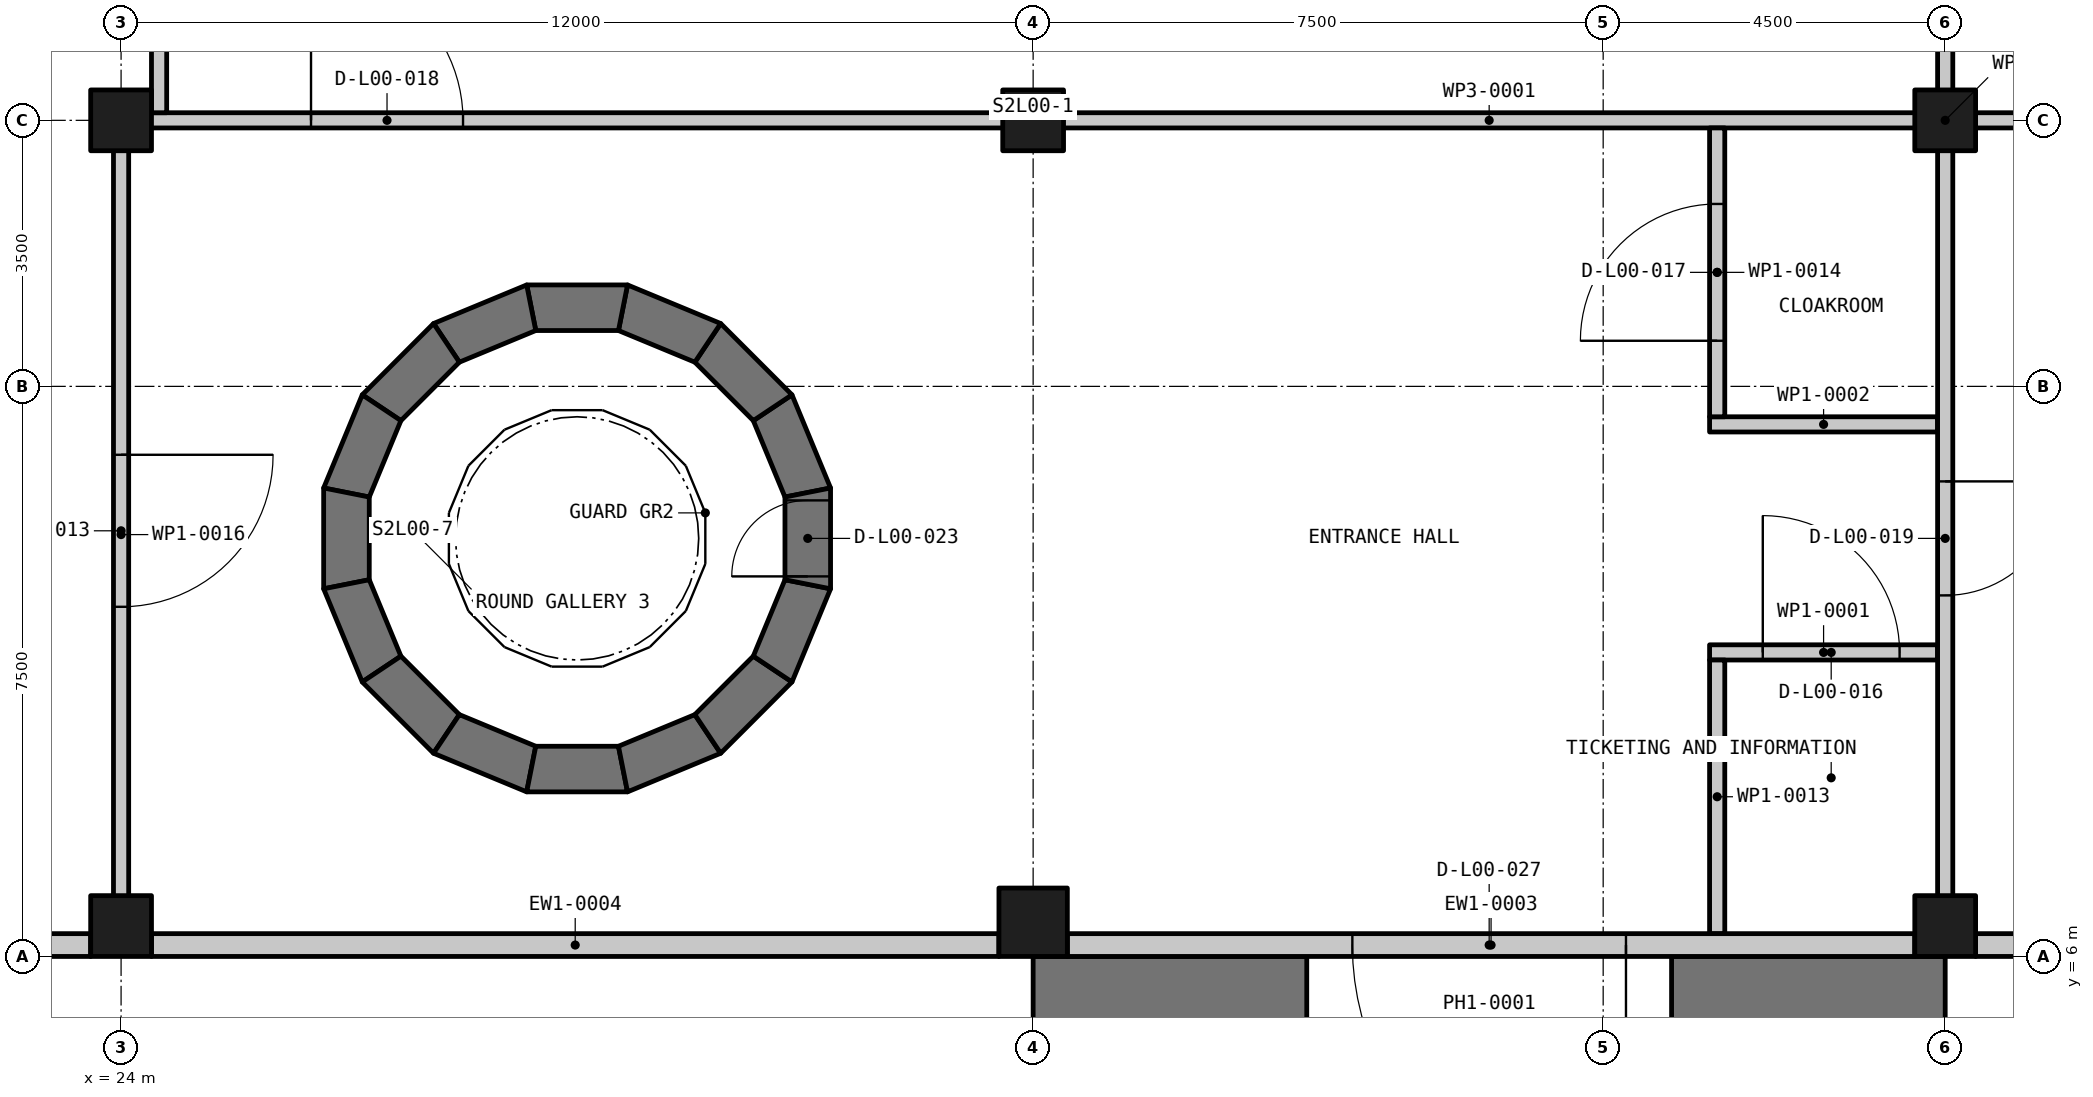
"""IFC4 building model, lengths in metres.
Left out: names, types, materials, properties, quantities, classifications, styles, units other than length and angle.
Written with IfcOpenShell. Run it as: python <this file> out.ifc"""

import sys

from ifc_helpers import new_model, si_unit, direction, frame, frame_2d, origin, origin_2d, place, context, subcontext, project, spatial, polyline, rectangle, outline, extrude, element, fill, save


model = new_model("IFC4")
c1 = context("Model", 3, precision=1e-05, world=origin(), true_north=direction((0.0, 1.0)))
c2 = subcontext(c1, "Body", "Model", "MODEL_VIEW")
j1 = project(units=[si_unit("LENGTHUNIT", "METRE"), si_unit("PLANEANGLEUNIT", "RADIAN")], contexts=[c1])
p1 = place(None, origin())
s1 = spatial("IfcSite", under=j1, at=p1, CompositionType="ELEMENT")
p2 = place(p1, origin())
s2 = spatial("IfcBuilding", under=s1, at=p2, CompositionType="ELEMENT")
p3 = place(p2, origin())
s3 = spatial("IfcBuildingStorey", under=s2, at=p3, CompositionType="ELEMENT", Elevation=0.0)
for number, where, z_axis, x_axis in (
    (1, (24.0, 6.4, -0.2), (0.0, 0.0, 1.0), (1.0, 0.0, 0.0)),
    (2, (24.0, 17.0, -0.2), (0.0, 0.0, 1.0), (1.0, 0.0, 0.0)),
):
    element("IfcColumn", number, at=place(p3, frame(where, z_axis=z_axis, x_axis=x_axis)), inside=s3, PredefinedType="COLUMN", context=c2, shape_type="SweptSolid", body=[
        extrude(rectangle(XDim=0.8, YDim=0.8, at=origin_2d()), origin(), (0.0, 0.0, 1.0), 5.9),
    ])
p4 = place(p3, frame((36.0, 6.45, -0.2), z_axis=(0.0, 0.0, 1.0), x_axis=(1.0, 0.0, 0.0)))
e3 = element("IfcColumn", 3, at=p4, inside=s3, PredefinedType="COLUMN", context=c2, shape_type="SweptSolid", body=[
    extrude(rectangle(XDim=0.9, YDim=0.9, at=origin_2d()), origin(), (0.0, 0.0, 1.0), 5.9),
])
for number, where, z_axis, x_axis in (
    (4, (36.0, 17.0, -0.2), (0.0, 0.0, 1.0), (1.0, 0.0, 0.0)),
    (5, (48.0, 6.4, -0.2), (0.0, 0.0, 1.0), (1.0, 0.0, 0.0)),
    (6, (48.0, 17.0, -0.2), (0.0, 0.0, 1.0), (1.0, 0.0, 0.0)),
):
    element("IfcColumn", number, at=place(p3, frame(where, z_axis=z_axis, x_axis=x_axis)), inside=s3, PredefinedType="COLUMN", context=c2, shape_type="SweptSolid", body=[
        extrude(rectangle(XDim=0.8, YDim=0.8, at=origin_2d()), origin(), (0.0, 0.0, 1.0), 5.9),
    ])
p5 = place(p3, frame((33.058, 12.049, -0.2), z_axis=(0.0, 0.0, 1.0), x_axis=(-0.382785205205, 0.923837370253, 0.0)))
e7 = element("IfcWall", 7, at=p5, inside=s3, PredefinedType="SHEAR", context=c2, shape_type="SweptSolid", body=[
    extrude(outline(polyline([(0.0, -0.3), (1.327, -0.3), (1.207, 0.3), (0.119, 0.3), (0.0, -0.3)])), origin(), (0.0, 0.0, 1.0), 5.9),
])
p6 = place(p3, frame((32.615, 13.177, -0.2), z_axis=(0.0, 0.0, 1.0), x_axis=(-0.707106781187, 0.707106781187, 0.0)))
e8 = element("IfcWall", 8, at=p6, inside=s3, PredefinedType="SHEAR", context=c2, shape_type="SweptSolid", body=[
    extrude(outline(polyline([(0.0, -0.3), (1.326, -0.3), (1.207, 0.3), (0.119, 0.3), (0.0, -0.3)])), origin(), (0.0, 0.0, 1.0), 5.9),
])
p7 = place(p3, frame((31.774, 14.05, -0.2), z_axis=(0.0, 0.0, 1.0), x_axis=(-0.923837370253, 0.382785205205, 0.0)))
e9 = element("IfcWall", 9, at=p7, inside=s3, PredefinedType="SHEAR", context=c2, shape_type="SweptSolid", body=[
    extrude(outline(polyline([(0.0, -0.3), (1.327, -0.3), (1.207, 0.3), (0.119, 0.3), (0.0, -0.3)])), origin(), (0.0, 0.0, 1.0), 5.9),
])
p8 = place(p3, frame((30.663, 14.535, -0.2), z_axis=(0.0, 0.0, 1.0), x_axis=(-1.0, 0.0, 0.0)))
e10 = element("IfcWall", 10, at=p8, inside=s3, PredefinedType="SHEAR", context=c2, shape_type="SweptSolid", body=[
    extrude(outline(polyline([(0.0, -0.3), (1.327, -0.3), (1.207, 0.3), (0.119, 0.3), (0.0, -0.3)])), origin(), (0.0, 0.0, 1.0), 5.9),
])
p9 = place(p3, frame((29.451, 14.558, -0.2), z_axis=(0.0, 0.0, 1.0), x_axis=(-0.923837370253, -0.382785205205, 0.0)))
e11 = element("IfcWall", 11, at=p9, inside=s3, PredefinedType="SHEAR", context=c2, shape_type="SweptSolid", body=[
    extrude(outline(polyline([(0.0, -0.3), (1.327, -0.3), (1.207, 0.3), (0.119, 0.3), (0.0, -0.3)])), origin(), (0.0, 0.0, 1.0), 5.9),
])
p10 = place(p3, frame((28.323, 14.115, -0.2), z_axis=(0.0, 0.0, 1.0), x_axis=(-0.707106781187, -0.707106781187, 0.0)))
e12 = element("IfcWall", 12, at=p10, inside=s3, PredefinedType="SHEAR", context=c2, shape_type="SweptSolid", body=[
    extrude(outline(polyline([(0.0, -0.3), (1.326, -0.3), (1.207, 0.3), (0.119, 0.3), (0.0, -0.3)])), origin(), (0.0, 0.0, 1.0), 5.9),
])
p11 = place(p3, frame((27.45, 13.274, -0.2), z_axis=(0.0, 0.0, 1.0), x_axis=(-0.382785205205, -0.923837370253, 0.0)))
e13 = element("IfcWall", 13, at=p11, inside=s3, PredefinedType="SHEAR", context=c2, shape_type="SweptSolid", body=[
    extrude(outline(polyline([(0.0, -0.3), (1.327, -0.3), (1.207, 0.3), (0.119, 0.3), (0.0, -0.3)])), origin(), (0.0, 0.0, 1.0), 5.9),
])
p12 = place(p3, frame((26.965, 12.163, -0.2), z_axis=(0.0, 0.0, 1.0), x_axis=(0.0, -1.0, 0.0)))
e14 = element("IfcWall", 14, at=p12, inside=s3, PredefinedType="SHEAR", context=c2, shape_type="SweptSolid", body=[
    extrude(outline(polyline([(0.0, -0.3), (1.327, -0.3), (1.207, 0.3), (0.119, 0.3), (0.0, -0.3)])), origin(), (0.0, 0.0, 1.0), 5.9),
])
p13 = place(p3, frame((26.942, 10.951, -0.2), z_axis=(0.0, 0.0, 1.0), x_axis=(0.382785205205, -0.923837370253, 0.0)))
e15 = element("IfcWall", 15, at=p13, inside=s3, PredefinedType="SHEAR", context=c2, shape_type="SweptSolid", body=[
    extrude(outline(polyline([(0.0, -0.3), (1.327, -0.3), (1.207, 0.3), (0.119, 0.3), (0.0, -0.3)])), origin(), (0.0, 0.0, 1.0), 5.9),
])
p14 = place(p3, frame((27.385, 9.823, -0.2), z_axis=(0.0, 0.0, 1.0), x_axis=(0.707106781187, -0.707106781187, 0.0)))
e16 = element("IfcWall", 16, at=p14, inside=s3, PredefinedType="SHEAR", context=c2, shape_type="SweptSolid", body=[
    extrude(outline(polyline([(0.0, -0.3), (1.326, -0.3), (1.207, 0.3), (0.119, 0.3), (0.0, -0.3)])), origin(), (0.0, 0.0, 1.0), 5.9),
])
p15 = place(p3, frame((28.226, 8.95, -0.2), z_axis=(0.0, 0.0, 1.0), x_axis=(0.923837370253, -0.382785205205, 0.0)))
e17 = element("IfcWall", 17, at=p15, inside=s3, PredefinedType="SHEAR", context=c2, shape_type="SweptSolid", body=[
    extrude(outline(polyline([(0.0, -0.3), (1.327, -0.3), (1.207, 0.3), (0.119, 0.3), (0.0, -0.3)])), origin(), (0.0, 0.0, 1.0), 5.9),
])
p16 = place(p3, frame((29.337, 8.465, -0.2), z_axis=(0.0, 0.0, 1.0), x_axis=(1.0, 0.0, 0.0)))
e18 = element("IfcWall", 18, at=p16, inside=s3, PredefinedType="SHEAR", context=c2, shape_type="SweptSolid", body=[
    extrude(outline(polyline([(0.0, -0.3), (1.327, -0.3), (1.207, 0.3), (0.119, 0.3), (0.0, -0.3)])), origin(), (0.0, 0.0, 1.0), 5.9),
])
p17 = place(p3, frame((30.549, 8.442, -0.2), z_axis=(0.0, 0.0, 1.0), x_axis=(0.923837370253, 0.382785205205, 0.0)))
e19 = element("IfcWall", 19, at=p17, inside=s3, PredefinedType="SHEAR", context=c2, shape_type="SweptSolid", body=[
    extrude(outline(polyline([(0.0, -0.3), (1.327, -0.3), (1.207, 0.3), (0.119, 0.3), (0.0, -0.3)])), origin(), (0.0, 0.0, 1.0), 5.9),
])
p18 = place(p3, frame((31.677, 8.885, -0.2), z_axis=(0.0, 0.0, 1.0), x_axis=(0.707106781187, 0.707106781187, 0.0)))
e20 = element("IfcWall", 20, at=p18, inside=s3, PredefinedType="SHEAR", context=c2, shape_type="SweptSolid", body=[
    extrude(outline(polyline([(0.0, -0.3), (1.326, -0.3), (1.207, 0.3), (0.119, 0.3), (0.0, -0.3)])), origin(), (0.0, 0.0, 1.0), 5.9),
])
p19 = place(p3, frame((32.55, 9.726, -0.2), z_axis=(0.0, 0.0, 1.0), x_axis=(0.382785205205, 0.923837370253, 0.0)))
e21 = element("IfcWall", 21, at=p19, inside=s3, PredefinedType="SHEAR", context=c2, shape_type="SweptSolid", body=[
    extrude(outline(polyline([(0.0, -0.3), (1.327, -0.3), (1.207, 0.3), (0.119, 0.3), (0.0, -0.3)])), origin(), (0.0, 0.0, 1.0), 5.9),
])
p20 = place(p3, frame((33.035, 10.837, -0.2), z_axis=(0.0, 0.0, 1.0), x_axis=(0.0, 1.0, 0.0)))
e22 = element("IfcWall", 22, at=p20, inside=s3, PredefinedType="SHEAR", context=c2, shape_type="SweptSolid", body=[
    extrude(outline(polyline([(0.0, -0.3), (1.327, -0.3), (1.207, 0.3), (0.119, 0.3), (0.0, -0.3)])), origin(), (0.0, 0.0, 1.0), 5.9),
])
p21 = place(p20, frame((0.163, 0.0, 0.2)))
e23 = element("IfcOpeningElement", 23, at=p21, cuts=e22, PredefinedType="OPENING", context=c2, shape_type="SweptSolid", body=[
    extrude(rectangle(XDim=1.0, YDim=2.2, at=frame_2d((0.5, 1.1))), frame((0.0, 0.31, 0.0), z_axis=(0.0, -1.0, 0.0), x_axis=(1.0, 0.0, 0.0)), (0.0, 0.0, 1.0), 0.62),
])
for number, where, z_axis, x_axis in (
    (24, (36.0, 5.0, -0.2), (0.0, 0.0, 1.0), (1.0, 0.0, 0.0)),
    (25, (44.4, 5.0, -0.2), (0.0, 0.0, 1.0), (1.0, 0.0, 0.0)),
):
    element("IfcWall", number, at=place(p3, frame(where, z_axis=z_axis, x_axis=x_axis)), inside=s3, PredefinedType="SOLIDWALL", context=c2, shape_type="SweptSolid", body=[
        extrude(rectangle(XDim=3.6, YDim=2.0, at=frame_2d((1.8, 0.0))), origin(), (0.0, 0.0, 1.0), 18.2),
    ])
p22 = place(p3, frame((59.6, 6.15, 0.0), z_axis=(0.0, 0.0, 1.0), x_axis=(-1.0, 0.0, 0.0)))
e26 = element("IfcWall", 26, at=p22, inside=s3, PredefinedType="SOLIDWALL", context=c2, shape_type="SweptSolid", body=[
    extrude(rectangle(XDim=11.2, YDim=0.3, at=frame_2d((5.6, 0.0))), origin(), (0.0, 0.0, 1.0), 4.8),
])
p23 = place(p3, frame((47.6, 6.15, 0.0), z_axis=(0.0, 0.0, 1.0), x_axis=(-1.0, 0.0, 0.0)))
e27 = element("IfcWall", 27, at=p23, inside=s3, PredefinedType="SOLIDWALL", context=c2, shape_type="SweptSolid", body=[
    extrude(rectangle(XDim=11.15, YDim=0.3, at=frame_2d((5.575, 0.0))), origin(), (0.0, 0.0, 1.0), 4.7),
])
p24 = place(p23, frame((3.8, 0.0, 0.0)))
e28 = element("IfcOpeningElement", 28, at=p24, cuts=e27, PredefinedType="OPENING", context=c2, shape_type="SweptSolid", body=[
    extrude(rectangle(XDim=3.6, YDim=2.4, at=frame_2d((1.8, 1.2))), frame((0.0, 0.16, 0.0), z_axis=(0.0, -1.0, 0.0), x_axis=(1.0, 0.0, 0.0)), (0.0, 0.0, 1.0), 0.32),
])
p25 = place(p3, frame((35.55, 6.15, 0.0), z_axis=(0.0, 0.0, 1.0), x_axis=(-1.0, 0.0, 0.0)))
e29 = element("IfcWall", 29, at=p25, inside=s3, PredefinedType="SOLIDWALL", context=c2, shape_type="SweptSolid", body=[
    extrude(rectangle(XDim=11.15, YDim=0.3, at=frame_2d((5.575, 0.0))), origin(), (0.0, 0.0, 1.0), 4.8),
])
p26 = place(p3, frame((23.6, 6.15, 0.0), z_axis=(0.0, 0.0, 1.0), x_axis=(-1.0, 0.0, 0.0)))
e30 = element("IfcWall", 30, at=p26, inside=s3, PredefinedType="SOLIDWALL", context=c2, shape_type="SweptSolid", body=[
    extrude(rectangle(XDim=11.2, YDim=0.3, at=frame_2d((5.6, 0.0))), origin(), (0.0, 0.0, 1.0), 4.8),
])
p27 = place(p26, frame((4.7, 0.0, 0.0)))
e31 = element("IfcOpeningElement", 31, at=p27, cuts=e30, PredefinedType="OPENING", context=c2, shape_type="SweptSolid", body=[
    extrude(rectangle(XDim=1.8, YDim=2.2, at=frame_2d((0.9, 1.1))), frame((0.0, 0.16, 0.0), z_axis=(0.0, -1.0, 0.0), x_axis=(1.0, 0.0, 0.0)), (0.0, 0.0, 1.0), 0.32),
])
p28 = place(p26, frame((7.85, 0.0, 1.5)))
e32 = element("IfcOpeningElement", 32, at=p28, cuts=e30, PredefinedType="OPENING", context=c2, shape_type="SweptSolid", body=[
    extrude(rectangle(XDim=1.5, YDim=3.0, at=frame_2d((0.75, 1.5))), frame((0.0, 0.16, 0.0), z_axis=(0.0, -1.0, 0.0), x_axis=(1.0, 0.0, 0.0)), (0.0, 0.0, 1.0), 0.32),
])
p29 = place(p26, frame((1.85, 0.0, 1.5)))
e33 = element("IfcOpeningElement", 33, at=p29, cuts=e30, PredefinedType="OPENING", context=c2, shape_type="SweptSolid", body=[
    extrude(rectangle(XDim=1.5, YDim=3.0, at=frame_2d((0.75, 1.5))), frame((0.0, 0.16, 0.0), z_axis=(0.0, -1.0, 0.0), x_axis=(1.0, 0.0, 0.0)), (0.0, 0.0, 1.0), 0.32),
])
p30 = place(p3, frame((39.6, 5.0, 4.2), z_axis=(0.0, 0.0, 1.0), x_axis=(1.0, 0.0, 0.0)))
e34 = element("IfcWall", 34, at=p30, inside=s3, PredefinedType="SOLIDWALL", context=c2, shape_type="SweptSolid", body=[
    extrude(rectangle(XDim=4.8, YDim=2.0, at=frame_2d((2.4, 0.0))), origin(), (0.0, 0.0, 1.0), 13.8),
])
p31 = place(p3, frame((44.9, 10.0, 0.0), z_axis=(0.0, 0.0, 1.0), x_axis=(1.0, 0.0, 0.0)))
e35 = element("IfcWall", 35, at=p31, inside=s3, PredefinedType="PARTITIONING", context=c2, shape_type="SweptSolid", body=[
    extrude(rectangle(XDim=3.0, YDim=0.2, at=frame_2d((1.5, 0.0))), origin(), (0.0, 0.0, 1.0), 4.8),
])
p32 = place(p31, frame((0.7, 0.0, 0.0)))
e36 = element("IfcOpeningElement", 36, at=p32, cuts=e35, PredefinedType="OPENING", context=c2, shape_type="SweptSolid", body=[
    extrude(rectangle(XDim=1.8, YDim=2.1, at=frame_2d((0.9, 1.05))), frame((0.0, 0.11, 0.0), z_axis=(0.0, -1.0, 0.0), x_axis=(1.0, 0.0, 0.0)), (0.0, 0.0, 1.0), 0.22),
])
p33 = place(p3, frame((44.9, 13.0, 0.0), z_axis=(0.0, 0.0, 1.0), x_axis=(1.0, 0.0, 0.0)))
e37 = element("IfcWall", 37, at=p33, inside=s3, PredefinedType="PARTITIONING", context=c2, shape_type="SweptSolid", body=[
    extrude(rectangle(XDim=3.0, YDim=0.2, at=frame_2d((1.5, 0.0))), origin(), (0.0, 0.0, 1.0), 4.8),
])
p34 = place(p3, frame((23.9, 17.0, 0.0), z_axis=(0.0, 0.0, 1.0), x_axis=(1.0, 0.0, 0.0)))
e38 = element("IfcWall", 38, at=p34, inside=s3, PredefinedType="PARTITIONING", context=c2, shape_type="SweptSolid", body=[
    extrude(rectangle(XDim=36.2, YDim=0.2, at=frame_2d((18.1, 0.0))), origin(), (0.0, 0.0, 1.0), 4.8),
])
p35 = place(p34, frame((2.599, 0.0, 0.0)))
e39 = element("IfcOpeningElement", 39, at=p35, cuts=e38, PredefinedType="OPENING", context=c2, shape_type="SweptSolid", body=[
    extrude(rectangle(XDim=2.0, YDim=2.1, at=frame_2d((1.0, 1.05))), frame((0.0, 0.11, 0.0), z_axis=(0.0, -1.0, 0.0), x_axis=(1.0, 0.0, 0.0)), (0.0, 0.0, 1.0), 0.22),
])
p36 = place(p34, frame((29.35, 0.0, 0.0)))
e40 = element("IfcOpeningElement", 40, at=p36, cuts=e38, PredefinedType="OPENING", context=c2, shape_type="SweptSolid", body=[
    extrude(rectangle(XDim=1.5, YDim=2.1, at=frame_2d((0.75, 1.05))), frame((0.0, 0.11, 0.0), z_axis=(0.0, -1.0, 0.0), x_axis=(1.0, 0.0, 0.0)), (0.0, 0.0, 1.0), 0.22),
])
p37 = place(p3, frame((48.0, 27.8, 0.0), z_axis=(0.0, 0.0, 1.0), x_axis=(0.0, -1.0, 0.0)))
e41 = element("IfcWall", 41, at=p37, inside=s3, PredefinedType="PARTITIONING", context=c2, shape_type="SweptSolid", body=[
    extrude(rectangle(XDim=21.6, YDim=0.2, at=frame_2d((10.8, 0.0))), origin(), (0.0, 0.0, 1.0), 4.8),
])
p38 = place(p37, frame((15.55, 0.0, 0.0)))
e42 = element("IfcOpeningElement", 42, at=p38, cuts=e41, PredefinedType="OPENING", context=c2, shape_type="SweptSolid", body=[
    extrude(rectangle(XDim=1.5, YDim=2.1, at=frame_2d((0.75, 1.05))), frame((0.0, 0.11, 0.0), z_axis=(0.0, -1.0, 0.0), x_axis=(1.0, 0.0, 0.0)), (0.0, 0.0, 1.0), 0.22),
])
p39 = place(p3, frame((45.0, 6.302, 0.0), z_axis=(0.0, 0.0, 1.0), x_axis=(0.0, 1.0, 0.0)))
e43 = element("IfcWall", 43, at=p39, inside=s3, PredefinedType="PARTITIONING", context=c2, shape_type="SweptSolid", body=[
    extrude(rectangle(XDim=3.598, YDim=0.2, at=frame_2d((1.799, 0.0))), origin(), (0.0, 0.0, 1.0), 4.7),
])
p40 = place(p3, frame((45.0, 13.1, 0.0), z_axis=(0.0, 0.0, 1.0), x_axis=(0.0, 1.0, 0.0)))
e44 = element("IfcWall", 44, at=p40, inside=s3, PredefinedType="PARTITIONING", context=c2, shape_type="SweptSolid", body=[
    extrude(rectangle(XDim=3.8, YDim=0.2, at=frame_2d((1.9, 0.0))), origin(), (0.0, 0.0, 1.0), 4.8),
])
p41 = place(p40, frame((1.0, 0.0, 0.0)))
e45 = element("IfcOpeningElement", 45, at=p41, cuts=e44, PredefinedType="OPENING", context=c2, shape_type="SweptSolid", body=[
    extrude(rectangle(XDim=1.8, YDim=2.1, at=frame_2d((0.9, 1.05))), frame((0.0, 0.11, 0.0), z_axis=(0.0, -1.0, 0.0), x_axis=(1.0, 0.0, 0.0)), (0.0, 0.0, 1.0), 0.22),
])
p42 = place(p3, frame((24.5, 17.1, 0.0), z_axis=(0.0, 0.0, 1.0), x_axis=(0.0, 1.0, 0.0)))
e46 = element("IfcWall", 46, at=p42, inside=s3, PredefinedType="PARTITIONING", context=c2, shape_type="SweptSolid", body=[
    extrude(rectangle(XDim=1.898, YDim=0.2, at=frame_2d((0.949, 0.0))), origin(), (0.0, 0.0, 1.0), 4.8),
])
p43 = place(p3, frame((24.0, 16.9, 0.0), z_axis=(0.0, 0.0, 1.0), x_axis=(0.0, -1.0, 0.0)))
e47 = element("IfcWall", 47, at=p43, inside=s3, PredefinedType="PARTITIONING", context=c2, shape_type="SweptSolid", body=[
    extrude(rectangle(XDim=10.7, YDim=0.2, at=frame_2d((5.35, 0.0))), origin(), (0.0, 0.0, 1.0), 4.8),
])
p44 = place(p43, frame((4.3, 0.0, 0.0)))
e48 = element("IfcOpeningElement", 48, at=p44, cuts=e47, PredefinedType="OPENING", context=c2, shape_type="SweptSolid", body=[
    extrude(rectangle(XDim=2.0, YDim=2.1, at=frame_2d((1.0, 1.05))), frame((0.0, 0.11, 0.0), z_axis=(0.0, -1.0, 0.0), x_axis=(1.0, 0.0, 0.0)), (0.0, 0.0, 1.0), 0.22),
])
p45 = place(p24, origin())
e49 = element("IfcDoor", 49, at=p45, inside=s3, OperationType="SINGLE_SWING_LEFT", PredefinedType="DOOR", context=c2, shape_type="SweptSolid", body=[
    extrude(rectangle(XDim=3.6, YDim=2.4, at=frame_2d((1.8, 1.2))), frame((0.0, 0.025, 0.0), z_axis=(0.0, -1.0, 0.0), x_axis=(1.0, 0.0, 0.0)), (0.0, 0.0, 1.0), 0.05),
])
fill(e28, e49)
p46 = place(p44, origin())
e50 = element("IfcDoor", 50, at=p46, inside=s3, OperationType="DOUBLE_DOOR_SINGLE_SWING", PredefinedType="DOOR", context=c2, shape_type="SweptSolid", body=[
    extrude(rectangle(XDim=2.0, YDim=2.1, at=frame_2d((1.0, 1.05))), frame((0.0, 0.025, 0.0), z_axis=(0.0, -1.0, 0.0), x_axis=(1.0, 0.0, 0.0)), (0.0, 0.0, 1.0), 0.05),
])
fill(e48, e50)
p47 = place(p32, origin())
e51 = element("IfcDoor", 51, at=p47, inside=s3, OperationType="DOUBLE_DOOR_SINGLE_SWING", PredefinedType="DOOR", context=c2, shape_type="SweptSolid", body=[
    extrude(rectangle(XDim=1.8, YDim=2.1, at=frame_2d((0.9, 1.05))), frame((0.0, 0.025, 0.0), z_axis=(0.0, -1.0, 0.0), x_axis=(1.0, 0.0, 0.0)), (0.0, 0.0, 1.0), 0.05),
])
fill(e36, e51)
p48 = place(p41, origin())
e52 = element("IfcDoor", 52, at=p48, inside=s3, OperationType="DOUBLE_DOOR_SINGLE_SWING", PredefinedType="DOOR", context=c2, shape_type="SweptSolid", body=[
    extrude(rectangle(XDim=1.8, YDim=2.1, at=frame_2d((0.9, 1.05))), frame((0.0, 0.025, 0.0), z_axis=(0.0, -1.0, 0.0), x_axis=(1.0, 0.0, 0.0)), (0.0, 0.0, 1.0), 0.05),
])
fill(e45, e52)
p49 = place(p35, origin())
e53 = element("IfcDoor", 53, at=p49, inside=s3, OperationType="DOUBLE_DOOR_SINGLE_SWING", PredefinedType="DOOR", context=c2, shape_type="SweptSolid", body=[
    extrude(rectangle(XDim=2.0, YDim=2.1, at=frame_2d((1.0, 1.05))), frame((0.0, 0.025, 0.0), z_axis=(0.0, -1.0, 0.0), x_axis=(1.0, 0.0, 0.0)), (0.0, 0.0, 1.0), 0.05),
])
fill(e39, e53)
p50 = place(p38, origin())
e54 = element("IfcDoor", 54, at=p50, inside=s3, OperationType="DOUBLE_DOOR_SINGLE_SWING", PredefinedType="DOOR", context=c2, shape_type="SweptSolid", body=[
    extrude(rectangle(XDim=1.5, YDim=2.1, at=frame_2d((0.75, 1.05))), frame((0.0, 0.025, 0.0), z_axis=(0.0, -1.0, 0.0), x_axis=(1.0, 0.0, 0.0)), (0.0, 0.0, 1.0), 0.05),
])
fill(e42, e54)
p51 = place(p21, origin())
e55 = element("IfcDoor", 55, at=p51, inside=s3, OperationType="SINGLE_SWING_LEFT", PredefinedType="DOOR", context=c2, shape_type="SweptSolid", body=[
    extrude(rectangle(XDim=1.0, YDim=2.2, at=frame_2d((0.5, 1.1))), frame((0.0, 0.025, 0.0), z_axis=(0.0, -1.0, 0.0), x_axis=(1.0, 0.0, 0.0)), (0.0, 0.0, 1.0), 0.05),
])
fill(e23, e55)
save(model, sys.argv[1])
